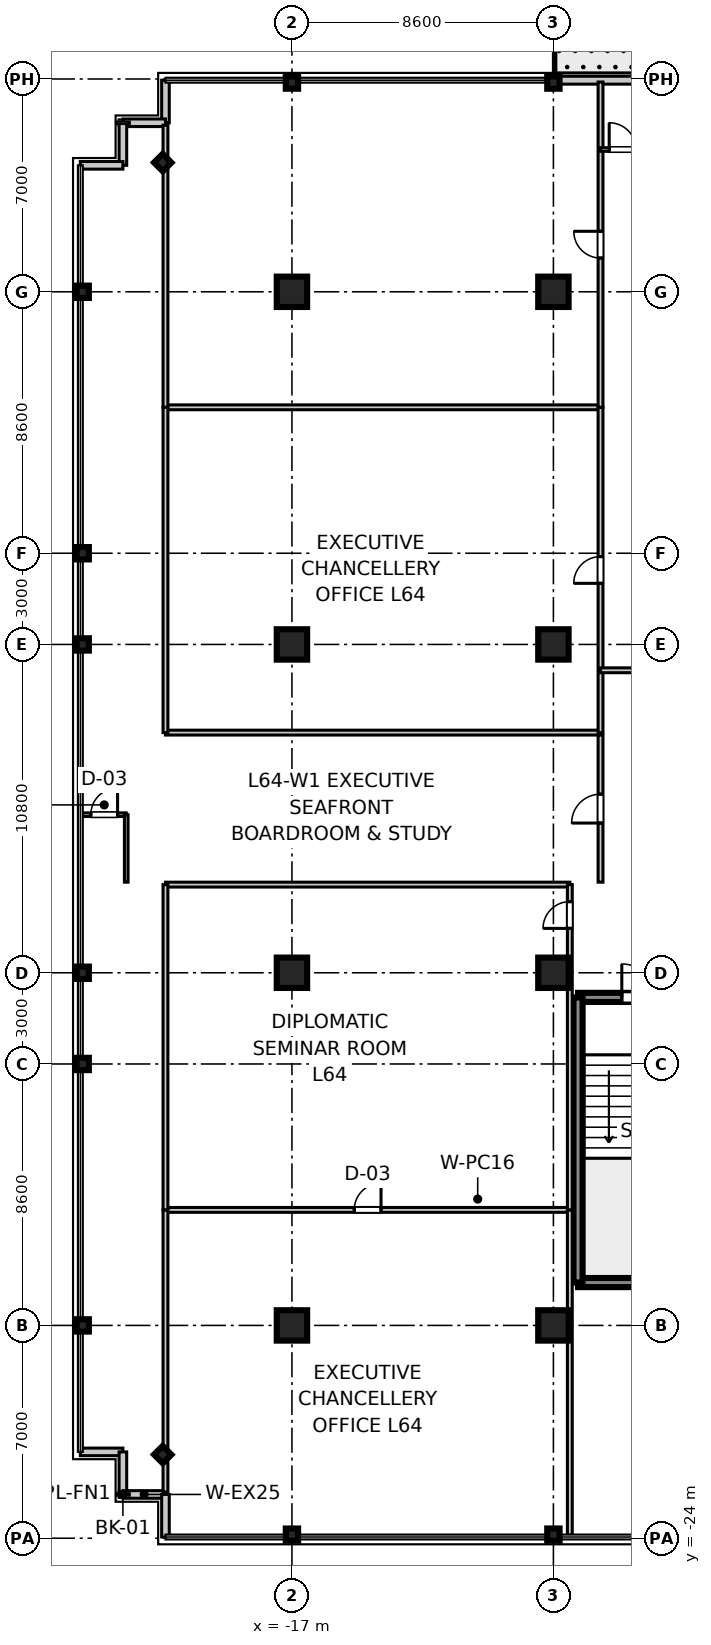
"""IFC4 building model, lengths in metres.
Left out: names, types, materials, properties, quantities, classifications, styles, units other than length and angle.
Written with IfcOpenShell. Run it as: python <this file> out.ifc"""

import sys

from ifc_helpers import new_model, si_unit, direction, frame, frame_2d, origin, origin_2d, place, context, subcontext, project, spatial, rectangle, i_section, extrude, source, transform, mapped, element, fill, save


model = new_model("IFC4")
c1 = context("Model", 3, precision=1e-05, world=origin(), true_north=direction((0.0, 1.0)))
c2 = subcontext(c1, "Body", "Model", "MODEL_VIEW")
j1 = project(units=[si_unit("LENGTHUNIT", "METRE"), si_unit("PLANEANGLEUNIT", "RADIAN")], contexts=[c1])
p1 = place(None, origin())
s1 = spatial("IfcSite", under=j1, at=p1, CompositionType="ELEMENT")
p2 = place(p1, origin())
s2 = spatial("IfcBuilding", under=s1, at=p2, CompositionType="ELEMENT")
p3 = place(p2, frame((0.0, 0.0, 249.3)))
s3 = spatial("IfcBuildingStorey", under=s2, at=p3, CompositionType="ELEMENT", Elevation=249.3)
m1 = source(origin(), c2, "Body", "SweptSolid", [
    extrude(rectangle(XDim=1.0, YDim=1.0, at=origin_2d()), origin(), (0.0, 0.0, 1.0), 3.655),
])
for number, where, z_axis, x_axis in (
    (1, (-17.0, -17.0, 0.0), (0.0, 0.0, 1.0), (1.0, 0.0, 0.0)),
    (2, (-17.0, -5.4, 0.0), (0.0, 0.0, 1.0), (1.0, 0.0, 0.0)),
    (3, (-17.0, 5.4, 0.0), (0.0, 0.0, 1.0), (1.0, 0.0, 0.0)),
    (4, (-17.0, 17.0, 0.0), (0.0, 0.0, 1.0), (1.0, 0.0, 0.0)),
    (5, (-8.4, -17.0, 0.0), (0.0, 0.0, 1.0), (1.0, 0.0, 0.0)),
    (6, (-8.4, -5.4, 0.0), (0.0, 0.0, 1.0), (1.0, 0.0, 0.0)),
    (7, (-8.4, 5.4, 0.0), (0.0, 0.0, 1.0), (1.0, 0.0, 0.0)),
    (8, (-8.4, 17.0, 0.0), (0.0, 0.0, 1.0), (1.0, 0.0, 0.0)),
):
    element("IfcColumn", number, at=place(p3, frame(where, z_axis=z_axis, x_axis=x_axis)), inside=s3, PredefinedType="COLUMN", context=c2, shape_type="MappedRepresentation", body=[
        mapped(m1, transform((0.0, 0.0, 0.0), scale=1.0)),
    ])
m2 = source(origin(), c2, "Body", "SweptSolid", [
    extrude(i_section(OverallWidth=0.401, OverallDepth=0.406, WebThickness=0.016, FlangeThickness=0.025, at=origin_2d()), origin(), (0.0, 0.0, 1.0), 3.655),
])
for number, where, z_axis, x_axis in (
    (9, (-23.88, -17.0, 0.0), (0.0, 0.0, 1.0), (1.0, 0.0, 0.0)),
    (10, (-23.88, -8.4, 0.0), (0.0, 0.0, 1.0), (1.0, 0.0, 0.0)),
    (11, (-23.88, -5.4, 0.0), (0.0, 0.0, 1.0), (1.0, 0.0, 0.0)),
    (12, (-23.88, 5.4, 0.0), (0.0, 0.0, 1.0), (1.0, 0.0, 0.0)),
    (13, (-23.88, 8.4, 0.0), (0.0, 0.0, 1.0), (1.0, 0.0, 0.0)),
    (14, (-23.88, 17.0, 0.0), (0.0, 0.0, 1.0), (1.0, 0.0, 0.0)),
    (15, (-17.0, -23.88, 0.0), (0.0, 0.0, 1.0), (0.0, 1.0, 0.0)),
    (16, (-17.0, 23.88, 0.0), (0.0, 0.0, 1.0), (0.0, 1.0, 0.0)),
    (17, (-8.4, -23.88, 0.0), (0.0, 0.0, 1.0), (0.0, 1.0, 0.0)),
    (18, (-8.4, 23.88, 0.0), (0.0, 0.0, 1.0), (0.0, 1.0, 0.0)),
    (19, (-21.25, -21.25, 0.0), (0.0, 0.0, 1.0), (0.707, 0.707, 0.0)),
    (20, (-21.25, 21.25, 0.0), (0.0, 0.0, 1.0), (0.707, 0.707, 0.0)),
):
    element("IfcColumn", number, at=place(p3, frame(where, z_axis=z_axis, x_axis=x_axis)), inside=s3, PredefinedType="COLUMN", context=c2, shape_type="MappedRepresentation", body=[
        mapped(m2, transform((0.0, 0.0, 0.0), scale=1.0)),
    ])
m3 = source(origin(), c2, "Body", "SweptSolid", [
    extrude(rectangle(XDim=3.98, YDim=0.3, at=frame_2d((1.99, 0.0))), origin(), (0.0, 0.0, 1.0), 3.41),
])
p4 = place(p3, frame((-7.59, -15.59, 0.0), z_axis=(0.0, 0.0, 1.0), x_axis=(1.0, 0.0, 0.0)))
e21 = element("IfcWall", 21, at=p4, inside=s3, PredefinedType="SHEAR", context=c2, shape_type="MappedRepresentation", body=[
    mapped(m3, transform((0.0, 0.0, 0.0), scale=1.0)),
])
p5 = place(p3, frame((-7.59, -6.21, 0.0), z_axis=(0.0, 0.0, 1.0), x_axis=(1.0, 0.0, 0.0)))
e22 = element("IfcWall", 22, at=p5, inside=s3, PredefinedType="SHEAR", context=c2, shape_type="MappedRepresentation", body=[
    mapped(m3, transform((0.0, 0.0, 0.0), scale=1.0)),
])
p6 = place(p5, frame((1.44, 0.0, 0.0)))
e23 = element("IfcOpeningElement", 23, at=p6, cuts=e22, PredefinedType="OPENING", context=c2, shape_type="SweptSolid", body=[
    extrude(rectangle(XDim=1.1, YDim=2.15, at=frame_2d((0.55, 1.075))), frame((0.0, 0.16, 0.0), z_axis=(0.0, -1.0, 0.0), x_axis=(1.0, 0.0, 0.0)), (0.0, 0.0, 1.0), 0.32),
])
m4 = source(origin(), c2, "Body", "SweptSolid", [
    extrude(rectangle(XDim=9.38, YDim=0.3, at=frame_2d((4.69, 0.0))), origin(), (0.0, 0.0, 1.0), 3.41),
])
p7 = place(p3, frame((-7.59, -15.59, 0.0), z_axis=(0.0, 0.0, 1.0), x_axis=(0.0, 1.0, 0.0)))
e24 = element("IfcWall", 24, at=p7, inside=s3, PredefinedType="SHEAR", context=c2, shape_type="MappedRepresentation", body=[
    mapped(m4, transform((0.0, 0.0, 0.0), scale=1.0)),
])
m5 = source(origin(), c2, "Body", "SweptSolid", [
    extrude(rectangle(XDim=1.4, YDim=0.25, at=frame_2d((0.7, 0.0))), origin(), (0.0, 0.0, 1.0), 3.41),
])
p8 = place(p3, frame((-21.16, 22.56, 0.0), z_axis=(0.0, 0.0, 1.0), x_axis=(0.0, 1.0, 0.0)))
e25 = element("IfcWall", 25, at=p8, inside=s3, PredefinedType="STANDARD", context=c2, shape_type="MappedRepresentation", body=[
    mapped(m5, transform((0.0, 0.0, 0.0), scale=1.0)),
])
m6 = source(origin(), c2, "Body", "SweptSolid", [
    extrude(rectangle(XDim=1.4, YDim=0.25, at=frame_2d((0.7, 0.0))), origin(), (0.0, 0.0, 1.0), 3.41),
])
for number, where, z_axis, x_axis in (
    (26, (-22.56, 22.56, 0.0), (0.0, 0.0, 1.0), (1.0, 0.0, 0.0)),
    (27, (-22.56, 21.16, 0.0), (0.0, 0.0, 1.0), (0.0, 1.0, 0.0)),
):
    element("IfcWall", number, at=place(p3, frame(where, z_axis=z_axis, x_axis=x_axis)), inside=s3, PredefinedType="STANDARD", context=c2, shape_type="MappedRepresentation", body=[
        mapped(m6, transform((0.0, 0.0, 0.0), scale=1.0)),
    ])
for number, where, z_axis, x_axis in (
    (28, (-23.96, 21.16, 0.0), (0.0, 0.0, 1.0), (1.0, 0.0, 0.0)),
    (29, (-23.96, -21.16, 0.0), (0.0, 0.0, 1.0), (1.0, 0.0, 0.0)),
):
    element("IfcWall", number, at=place(p3, frame(where, z_axis=z_axis, x_axis=x_axis)), inside=s3, PredefinedType="STANDARD", context=c2, shape_type="MappedRepresentation", body=[
        mapped(m5, transform((0.0, 0.0, 0.0), scale=1.0)),
    ])
for number, where, z_axis, x_axis in (
    (30, (-22.56, -22.56, 0.0), (0.0, 0.0, 1.0), (0.0, 1.0, 0.0)),
    (31, (-22.56, -22.56, 0.0), (0.0, 0.0, 1.0), (1.0, 0.0, 0.0)),
):
    element("IfcWall", number, at=place(p3, frame(where, z_axis=z_axis, x_axis=x_axis)), inside=s3, PredefinedType="STANDARD", context=c2, shape_type="MappedRepresentation", body=[
        mapped(m6, transform((0.0, 0.0, 0.0), scale=1.0)),
    ])
p9 = place(p3, frame((-21.16, -23.96, 0.0), z_axis=(0.0, 0.0, 1.0), x_axis=(0.0, 1.0, 0.0)))
e32 = element("IfcWall", 32, at=p9, inside=s3, PredefinedType="STANDARD", context=c2, shape_type="MappedRepresentation", body=[
    mapped(m5, transform((0.0, 0.0, 0.0), scale=1.0)),
])
m7 = source(origin(), c2, "Body", "SweptSolid", [
    extrude(rectangle(XDim=11.2, YDim=0.26, at=frame_2d((5.6, 0.0))), origin(), (0.0, 0.0, 1.0), 2.89),
])
p10 = place(p3, frame((-8.4, 23.96, 0.0), z_axis=(0.0, 0.0, 1.0), x_axis=(1.0, 0.0, 0.0)))
e33 = element("IfcWall", 33, at=p10, inside=s3, PredefinedType="STANDARD", context=c2, shape_type="MappedRepresentation", body=[
    mapped(m7, transform((0.0, 0.0, 0.0), scale=1.0)),
])
p11 = place(p10, frame((7.5, 0.0, 0.0)))
e34 = element("IfcOpeningElement", 34, at=p11, cuts=e33, PredefinedType="OPENING", context=c2, shape_type="SweptSolid", body=[
    extrude(rectangle(XDim=1.8, YDim=2.25, at=frame_2d((0.9, 1.125))), frame((0.0, 0.14, 0.0), z_axis=(0.0, -1.0, 0.0), x_axis=(1.0, 0.0, 0.0)), (0.0, 0.0, 1.0), 0.28),
])
p12 = place(p10, frame((3.225, 0.0, 0.85)))
e35 = element("IfcOpeningElement", 35, at=p12, cuts=e33, PredefinedType="OPENING", context=c2, shape_type="SweptSolid", body=[
    extrude(rectangle(XDim=1.6, YDim=1.8, at=frame_2d((0.8, 0.9))), frame((0.0, 0.14, 0.0), z_axis=(0.0, -1.0, 0.0), x_axis=(1.0, 0.0, 0.0)), (0.0, 0.0, 1.0), 0.28),
])
m8 = source(origin(), c2, "Body", "SweptSolid", [
    extrude(rectangle(XDim=14.31, YDim=0.16, at=frame_2d((7.155, 0.0))), origin(), (0.0, 0.0, 1.0), 2.75),
])
for number, where, z_axis, x_axis in (
    (36, (-21.16, 2.5, 0.0), (0.0, 0.0, 1.0), (1.0, 0.0, 0.0)),
    (37, (-21.16, 13.2, 0.0), (0.0, 0.0, 1.0), (1.0, 0.0, 0.0)),
):
    element("IfcWall", number, at=place(p3, frame(where, z_axis=z_axis, x_axis=x_axis)), inside=s3, PredefinedType="PARTITIONING", context=c2, shape_type="MappedRepresentation", body=[
        mapped(m8, transform((0.0, 0.0, 0.0), scale=1.0)),
    ])
m9 = source(origin(), c2, "Body", "SweptSolid", [
    extrude(rectangle(XDim=10.7, YDim=0.16, at=frame_2d((5.35, 0.0))), origin(), (0.0, 0.0, 1.0), 2.75),
])
p13 = place(p3, frame((-21.16, 2.5, 0.0), z_axis=(0.0, 0.0, 1.0), x_axis=(0.0, 1.0, 0.0)))
e38 = element("IfcWall", 38, at=p13, inside=s3, PredefinedType="PARTITIONING", context=c2, shape_type="MappedRepresentation", body=[
    mapped(m9, transform((0.0, 0.0, 0.0), scale=1.0)),
])
p14 = place(p3, frame((-6.85, 2.5, 0.0), z_axis=(0.0, 0.0, 1.0), x_axis=(0.0, 1.0, 0.0)))
e39 = element("IfcWall", 39, at=p14, inside=s3, PredefinedType="PARTITIONING", context=c2, shape_type="MappedRepresentation", body=[
    mapped(m9, transform((0.0, 0.0, 0.0), scale=1.0)),
])
p15 = place(p14, frame((4.91, 0.0, 0.0)))
e40 = element("IfcOpeningElement", 40, at=p15, cuts=e39, PredefinedType="OPENING", context=c2, shape_type="SweptSolid", body=[
    extrude(rectangle(XDim=0.88, YDim=2.1, at=frame_2d((0.44, 1.05))), frame((0.0, 0.09, 0.0), z_axis=(0.0, -1.0, 0.0), x_axis=(1.0, 0.0, 0.0)), (0.0, 0.0, 1.0), 0.18),
])
m10 = source(origin(), c2, "Body", "SweptSolid", [
    extrude(rectangle(XDim=9.28, YDim=0.16, at=frame_2d((4.64, 0.0))), origin(), (0.0, 0.0, 1.0), 2.75),
])
p16 = place(p3, frame((-21.16, 13.2, 0.0), z_axis=(0.0, 0.0, 1.0), x_axis=(0.0, 1.0, 0.0)))
e41 = element("IfcWall", 41, at=p16, inside=s3, PredefinedType="PARTITIONING", context=c2, shape_type="MappedRepresentation", body=[
    mapped(m10, transform((0.0, 0.0, 0.0), scale=1.0)),
])
p17 = place(p3, frame((-6.85, 13.2, 0.0), z_axis=(0.0, 0.0, 1.0), x_axis=(0.0, 1.0, 0.0)))
e42 = element("IfcWall", 42, at=p17, inside=s3, PredefinedType="PARTITIONING", context=c2, shape_type="MappedRepresentation", body=[
    mapped(m9, transform((0.0, 0.0, 0.0), scale=1.0)),
])
p18 = place(p17, frame((4.91, 0.0, 0.0)))
e43 = element("IfcOpeningElement", 43, at=p18, cuts=e42, PredefinedType="OPENING", context=c2, shape_type="SweptSolid", body=[
    extrude(rectangle(XDim=0.88, YDim=2.1, at=frame_2d((0.44, 1.05))), frame((0.0, 0.09, 0.0), z_axis=(0.0, -1.0, 0.0), x_axis=(1.0, 0.0, 0.0)), (0.0, 0.0, 1.0), 0.18),
])
m11 = source(origin(), c2, "Body", "SweptSolid", [
    extrude(rectangle(XDim=10.19, YDim=0.16, at=frame_2d((5.095, 0.0))), origin(), (0.0, 0.0, 1.0), 2.75),
])
p19 = place(p3, frame((-6.85, 4.55, 0.0), z_axis=(0.0, 0.0, 1.0), x_axis=(1.0, 0.0, 0.0)))
e44 = element("IfcWall", 44, at=p19, inside=s3, PredefinedType="PARTITIONING", context=c2, shape_type="MappedRepresentation", body=[
    mapped(m11, transform((0.0, 0.0, 0.0), scale=1.0)),
])
p20 = place(p19, frame((6.178, 0.0, 0.0)))
e45 = element("IfcOpeningElement", 45, at=p20, cuts=e44, PredefinedType="OPENING", context=c2, shape_type="SweptSolid", body=[
    extrude(rectangle(XDim=1.5, YDim=2.15, at=frame_2d((0.75, 1.075))), frame((0.0, 0.09, 0.0), z_axis=(0.0, -1.0, 0.0), x_axis=(1.0, 0.0, 0.0)), (0.0, 0.0, 1.0), 0.18),
])
m12 = source(origin(), c2, "Body", "SweptSolid", [
    extrude(rectangle(XDim=1.45, YDim=0.12, at=frame_2d((0.725, 0.0))), origin(), (0.0, 0.0, 1.0), 2.75),
])
p21 = place(p3, frame((-6.85, 21.68, 0.0), z_axis=(0.0, 0.0, 1.0), x_axis=(1.0, 0.0, 0.0)))
e46 = element("IfcWall", 46, at=p21, inside=s3, PredefinedType="PARTITIONING", context=c2, shape_type="MappedRepresentation", body=[
    mapped(m12, transform((0.0, 0.0, 0.0), scale=1.0)),
])
p22 = place(p21, frame((0.285, 0.0, 0.0)))
e47 = element("IfcOpeningElement", 47, at=p22, cuts=e46, PredefinedType="OPENING", context=c2, shape_type="SweptSolid", body=[
    extrude(rectangle(XDim=0.88, YDim=2.1, at=frame_2d((0.44, 1.05))), frame((0.0, 0.07, 0.0), z_axis=(0.0, -1.0, 0.0), x_axis=(1.0, 0.0, 0.0)), (0.0, 0.0, 1.0), 0.14),
])
m13 = source(origin(), c2, "Body", "SweptSolid", [
    extrude(rectangle(XDim=13.3, YDim=0.16, at=frame_2d((6.65, 0.0))), origin(), (0.0, 0.0, 1.0), 2.75),
])
p23 = place(p3, frame((-21.16, -13.2, 0.0), z_axis=(0.0, 0.0, 1.0), x_axis=(1.0, 0.0, 0.0)))
e48 = element("IfcWall", 48, at=p23, inside=s3, PredefinedType="PARTITIONING", context=c2, shape_type="MappedRepresentation", body=[
    mapped(m13, transform((0.0, 0.0, 0.0), scale=1.0)),
])
p24 = place(p23, frame((6.21, 0.0, 0.0)))
e49 = element("IfcOpeningElement", 49, at=p24, cuts=e48, PredefinedType="OPENING", context=c2, shape_type="SweptSolid", body=[
    extrude(rectangle(XDim=0.88, YDim=2.1, at=frame_2d((0.44, 1.05))), frame((0.0, 0.09, 0.0), z_axis=(0.0, -1.0, 0.0), x_axis=(1.0, 0.0, 0.0)), (0.0, 0.0, 1.0), 0.18),
])
p25 = place(p3, frame((-21.16, -22.48, 0.0), z_axis=(0.0, 0.0, 1.0), x_axis=(0.0, 1.0, 0.0)))
e50 = element("IfcWall", 50, at=p25, inside=s3, PredefinedType="PARTITIONING", context=c2, shape_type="MappedRepresentation", body=[
    mapped(m10, transform((0.0, 0.0, 0.0), scale=1.0)),
])
p26 = place(p3, frame((-7.86, -23.9, 0.0), z_axis=(0.0, 0.0, 1.0), x_axis=(0.0, 1.0, 0.0)))
e51 = element("IfcWall", 51, at=p26, inside=s3, PredefinedType="PARTITIONING", context=c2, shape_type="MappedRepresentation", body=[
    mapped(m9, transform((0.0, 0.0, 0.0), scale=1.0)),
])
p27 = place(p3, frame((-21.16, -2.5, 0.0), z_axis=(0.0, 0.0, 1.0), x_axis=(1.0, 0.0, 0.0)))
e52 = element("IfcWall", 52, at=p27, inside=s3, PredefinedType="PARTITIONING", context=c2, shape_type="MappedRepresentation", body=[
    mapped(m13, transform((0.0, 0.0, 0.0), scale=1.0)),
])
p28 = place(p3, frame((-21.16, -13.2, 0.0), z_axis=(0.0, 0.0, 1.0), x_axis=(0.0, 1.0, 0.0)))
e53 = element("IfcWall", 53, at=p28, inside=s3, PredefinedType="PARTITIONING", context=c2, shape_type="MappedRepresentation", body=[
    mapped(m9, transform((0.0, 0.0, 0.0), scale=1.0)),
])
p29 = place(p3, frame((-7.86, -13.2, 0.0), z_axis=(0.0, 0.0, 1.0), x_axis=(0.0, 1.0, 0.0)))
e54 = element("IfcWall", 54, at=p29, inside=s3, PredefinedType="PARTITIONING", context=c2, shape_type="MappedRepresentation", body=[
    mapped(m9, transform((0.0, 0.0, 0.0), scale=1.0)),
])
p30 = place(p29, frame((9.26, 0.0, 0.0)))
e55 = element("IfcOpeningElement", 55, at=p30, cuts=e54, PredefinedType="OPENING", context=c2, shape_type="SweptSolid", body=[
    extrude(rectangle(XDim=0.88, YDim=2.1, at=frame_2d((0.44, 1.05))), frame((0.0, 0.09, 0.0), z_axis=(0.0, -1.0, 0.0), x_axis=(1.0, 0.0, 0.0)), (0.0, 0.0, 1.0), 0.18),
])
m14 = source(origin(), c2, "Body", "SweptSolid", [
    extrude(rectangle(XDim=4.84, YDim=0.16, at=frame_2d((2.42, 0.0))), origin(), (0.0, 0.0, 1.0), 2.75),
])
p31 = place(p3, frame((-6.85, -2.42, 0.0), z_axis=(0.0, 0.0, 1.0), x_axis=(0.0, 1.0, 0.0)))
e56 = element("IfcWall", 56, at=p31, inside=s3, PredefinedType="PARTITIONING", context=c2, shape_type="MappedRepresentation", body=[
    mapped(m14, transform((0.0, 0.0, 0.0), scale=1.0)),
])
p32 = place(p31, frame((1.945, 0.0, 0.0)))
e57 = element("IfcOpeningElement", 57, at=p32, cuts=e56, PredefinedType="OPENING", context=c2, shape_type="SweptSolid", body=[
    extrude(rectangle(XDim=0.95, YDim=2.1, at=frame_2d((0.475, 1.05))), frame((0.0, 0.09, 0.0), z_axis=(0.0, -1.0, 0.0), x_axis=(1.0, 0.0, 0.0)), (0.0, 0.0, 1.0), 0.18),
])
m15 = source(origin(), c2, "Body", "SweptSolid", [
    extrude(rectangle(XDim=1.45, YDim=0.12, at=frame_2d((0.725, 0.0))), origin(), (0.0, 0.0, 1.0), 2.75),
])
p33 = place(p3, frame((-23.9, -0.2, 0.0), z_axis=(0.0, 0.0, 1.0), x_axis=(1.0, 0.0, 0.0)))
e58 = element("IfcWall", 58, at=p33, inside=s3, PredefinedType="PARTITIONING", context=c2, shape_type="MappedRepresentation", body=[
    mapped(m15, transform((0.0, 0.0, 0.0), scale=1.0)),
])
p34 = place(p33, frame((0.285, 0.0, 0.0)))
e59 = element("IfcOpeningElement", 59, at=p34, cuts=e58, PredefinedType="OPENING", context=c2, shape_type="SweptSolid", body=[
    extrude(rectangle(XDim=0.88, YDim=2.1, at=frame_2d((0.44, 1.05))), frame((0.0, 0.07, 0.0), z_axis=(0.0, -1.0, 0.0), x_axis=(1.0, 0.0, 0.0)), (0.0, 0.0, 1.0), 0.14),
])
m16 = source(origin(), c2, "Body", "SweptSolid", [
    extrude(rectangle(XDim=2.22, YDim=0.12, at=frame_2d((1.11, 0.0))), origin(), (0.0, 0.0, 1.0), 2.75),
])
p35 = place(p3, frame((-22.45, -2.42, 0.0), z_axis=(0.0, 0.0, 1.0), x_axis=(0.0, 1.0, 0.0)))
e60 = element("IfcWall", 60, at=p35, inside=s3, PredefinedType="PARTITIONING", context=c2, shape_type="MappedRepresentation", body=[
    mapped(m16, transform((0.0, 0.0, 0.0), scale=1.0)),
])
m17 = source(origin(), c2, "Body", "SweptSolid", [
    extrude(rectangle(XDim=1.1, YDim=2.15, at=frame_2d((0.55, 1.075))), frame((0.0, 0.025, 0.0), z_axis=(0.0, -1.0, 0.0), x_axis=(1.0, 0.0, 0.0)), (0.0, 0.0, 1.0), 0.05),
])
p36 = place(p6, frame((1.1, 0.0, 0.0), z_axis=(0.0, 0.0, 1.0), x_axis=(-1.0, 0.0, 0.0)))
e61 = element("IfcDoor", 61, at=p36, inside=s3, OperationType="SINGLE_SWING_LEFT", PredefinedType="DOOR", context=c2, shape_type="MappedRepresentation", body=[
    mapped(m17, transform((0.0, 0.0, 0.0), scale=1.0)),
])
fill(e23, e61)
m18 = source(origin(), c2, "Body", "SweptSolid", [
    extrude(rectangle(XDim=0.88, YDim=2.1, at=frame_2d((0.44, 1.05))), frame((0.0, 0.025, 0.0), z_axis=(0.0, -1.0, 0.0), x_axis=(1.0, 0.0, 0.0)), (0.0, 0.0, 1.0), 0.05),
])
p37 = place(p15, origin())
e62 = element("IfcDoor", 62, at=p37, inside=s3, OperationType="SINGLE_SWING_LEFT", PredefinedType="DOOR", context=c2, shape_type="MappedRepresentation", body=[
    mapped(m18, transform((0.0, 0.0, 0.0), scale=1.0)),
])
fill(e40, e62)
p38 = place(p18, origin())
e63 = element("IfcDoor", 63, at=p38, inside=s3, OperationType="SINGLE_SWING_RIGHT", PredefinedType="DOOR", context=c2, shape_type="MappedRepresentation", body=[
    mapped(m18, transform((0.0, 0.0, 0.0), scale=1.0)),
])
fill(e43, e63)
p39 = place(p22, origin())
e64 = element("IfcDoor", 64, at=p39, inside=s3, OperationType="SINGLE_SWING_LEFT", PredefinedType="DOOR", context=c2, shape_type="MappedRepresentation", body=[
    mapped(m18, transform((0.0, 0.0, 0.0), scale=1.0)),
])
fill(e47, e64)
p40 = place(p24, frame((0.88, 0.0, 0.0), z_axis=(0.0, 0.0, 1.0), x_axis=(-1.0, 0.0, 0.0)))
e65 = element("IfcDoor", 65, at=p40, inside=s3, OperationType="SINGLE_SWING_RIGHT", PredefinedType="DOOR", context=c2, shape_type="MappedRepresentation", body=[
    mapped(m18, transform((0.0, 0.0, 0.0), scale=1.0)),
])
fill(e49, e65)
p41 = place(p30, origin())
e66 = element("IfcDoor", 66, at=p41, inside=s3, OperationType="SINGLE_SWING_LEFT", PredefinedType="DOOR", context=c2, shape_type="MappedRepresentation", body=[
    mapped(m18, transform((0.0, 0.0, 0.0), scale=1.0)),
])
fill(e55, e66)
p42 = place(p34, frame((0.88, 0.0, 0.0), z_axis=(0.0, 0.0, 1.0), x_axis=(-1.0, 0.0, 0.0)))
e67 = element("IfcDoor", 67, at=p42, inside=s3, OperationType="SINGLE_SWING_RIGHT", PredefinedType="DOOR", context=c2, shape_type="MappedRepresentation", body=[
    mapped(m18, transform((0.0, 0.0, 0.0), scale=1.0)),
])
fill(e59, e67)
m19 = source(origin(), c2, "Body", "SweptSolid", [
    extrude(rectangle(XDim=0.95, YDim=2.1, at=frame_2d((0.475, 1.05))), frame((0.0, 0.025, 0.0), z_axis=(0.0, -1.0, 0.0), x_axis=(1.0, 0.0, 0.0)), (0.0, 0.0, 1.0), 0.05),
])
p43 = place(p32, origin())
e68 = element("IfcDoor", 68, at=p43, inside=s3, OperationType="SINGLE_SWING_LEFT", PredefinedType="DOOR", context=c2, shape_type="MappedRepresentation", body=[
    mapped(m19, transform((0.0, 0.0, 0.0), scale=1.0)),
])
fill(e57, e68)
save(model, sys.argv[1])
